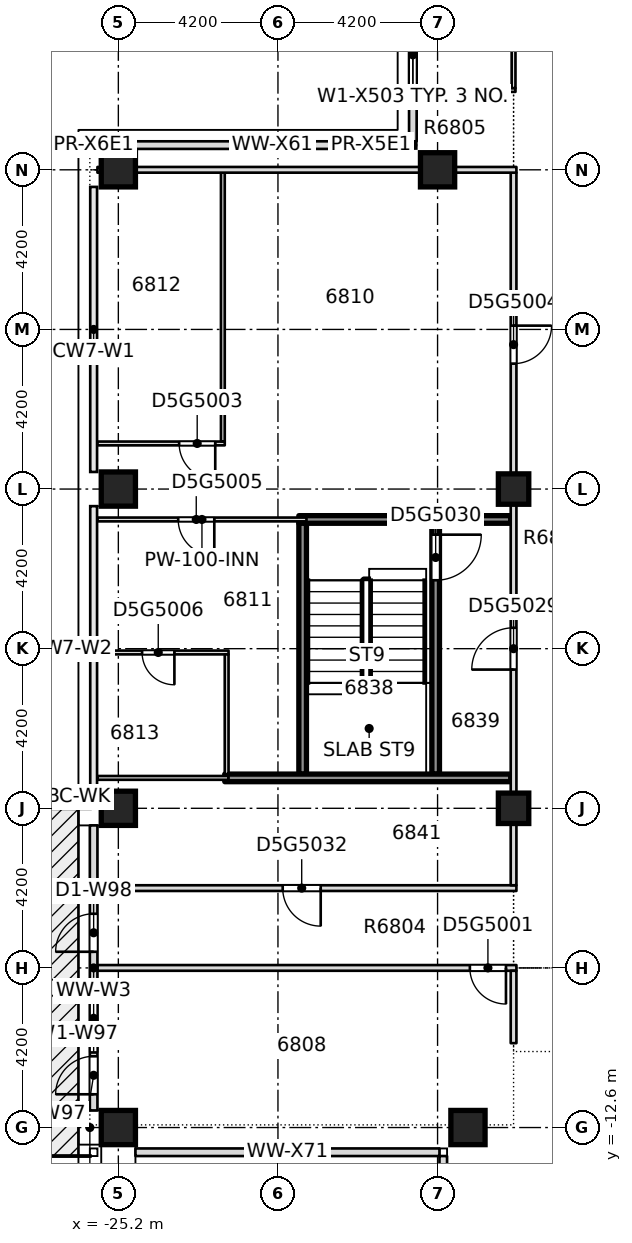
"""IFC4 building model, lengths in metres.
Left out: names, types, materials, properties, quantities, classifications, styles, units other than length and angle.
Written with IfcOpenShell. Run it as: python <this file> out.ifc"""

import sys

from ifc_helpers import new_model, si_unit, direction, frame, frame_2d, origin, origin_2d, place, context, subcontext, project, spatial, rectangle, extrude, element, fill, save


model = new_model("IFC4")
c1 = context("Model", 3, precision=1e-05, world=origin(), true_north=direction((0.0, 1.0)))
c2 = subcontext(c1, "Body", "Model", "MODEL_VIEW")
j1 = project(units=[si_unit("LENGTHUNIT", "METRE"), si_unit("PLANEANGLEUNIT", "RADIAN")], contexts=[c1])
p1 = place(None, origin())
s1 = spatial("IfcSite", under=j1, at=p1, CompositionType="ELEMENT")
p2 = place(p1, origin())
s2 = spatial("IfcBuilding", under=s1, at=p2, CompositionType="ELEMENT")
p3 = place(p2, frame((0.0, 0.0, 257.95)))
s3 = spatial("IfcBuildingStorey", under=s2, at=p3, CompositionType="ELEMENT", Elevation=257.95)
for number, where, z_axis, x_axis in (
    (1, (-25.2, -12.6, -0.4), (0.0, 0.0, 1.0), (1.0, 0.0, 0.0)),
    (2, (-16.0, -12.6, -0.4), (0.0, 0.0, 1.0), (1.0, 0.0, 0.0)),
    (3, (-25.2, -4.2, -0.4), (0.0, 0.0, 1.0), (1.0, 0.0, 0.0)),
    (4, (-25.2, 4.2, -0.4), (0.0, 0.0, 1.0), (1.0, 0.0, 0.0)),
    (5, (-25.2, 12.6, -0.4), (0.0, 0.0, 1.0), (1.0, 0.0, 0.0)),
    (6, (-16.8, 12.6, -0.4), (0.0, 0.0, 1.0), (1.0, 0.0, 0.0)),
):
    element("IfcColumn", number, at=place(p3, frame(where, z_axis=z_axis, x_axis=x_axis)), inside=s3, PredefinedType="COLUMN", context=c2, shape_type="SweptSolid", body=[
        extrude(rectangle(XDim=0.9, YDim=0.9, at=origin_2d()), origin(), (0.0, 0.0, 1.0), 3.45),
    ])
for number, where, z_axis, x_axis in (
    (7, (-14.8, -4.2, -0.4), (0.0, 0.0, 1.0), (1.0, 0.0, 0.0)),
    (8, (-14.8, 4.2, -0.4), (0.0, 0.0, 1.0), (1.0, 0.0, 0.0)),
):
    element("IfcColumn", number, at=place(p3, frame(where, z_axis=z_axis, x_axis=x_axis)), inside=s3, PredefinedType="COLUMN", context=c2, shape_type="SweptSolid", body=[
        extrude(rectangle(XDim=0.8, YDim=0.8, at=origin_2d()), origin(), (0.0, 0.0, 1.0), 3.45),
    ])
p4 = place(p3, frame((-25.75, -8.4, 0.0), z_axis=(0.0, 0.0, 1.0), x_axis=(1.0, 0.0, 0.0)))
e9 = element("IfcWall", 9, at=p4, inside=s3, PredefinedType="PARTITIONING", context=c2, shape_type="SweptSolid", body=[
    extrude(rectangle(XDim=11.025, YDim=0.15, at=frame_2d((5.512, 0.0))), origin(), (0.0, 0.0, 1.0), 3.05),
])
p5 = place(p4, frame((9.8, 0.0, 0.0)))
e10 = element("IfcOpeningElement", 10, at=p5, cuts=e9, PredefinedType="OPENING", context=c2, shape_type="SweptSolid", body=[
    extrude(rectangle(XDim=0.95, YDim=2.1, at=frame_2d((0.475, 1.05))), frame((0.0, 0.085, 0.0), z_axis=(0.0, -1.0, 0.0), x_axis=(1.0, 0.0, 0.0)), (0.0, 0.0, 1.0), 0.17),
])
p6 = place(p3, frame((-25.75, -6.3, 0.0), z_axis=(0.0, 0.0, 1.0), x_axis=(1.0, 0.0, 0.0)))
e11 = element("IfcWall", 11, at=p6, inside=s3, PredefinedType="PARTITIONING", context=c2, shape_type="SweptSolid", body=[
    extrude(rectangle(XDim=11.025, YDim=0.15, at=frame_2d((5.512, 0.0))), origin(), (0.0, 0.0, 1.0), 3.05),
])
p7 = place(p6, frame((4.875, 0.0, 0.0)))
e12 = element("IfcOpeningElement", 12, at=p7, cuts=e11, PredefinedType="OPENING", context=c2, shape_type="SweptSolid", body=[
    extrude(rectangle(XDim=1.0, YDim=2.1, at=frame_2d((0.5, 1.05))), frame((0.0, 0.085, 0.0), z_axis=(0.0, -1.0, 0.0), x_axis=(1.0, 0.0, 0.0)), (0.0, 0.0, 1.0), 0.17),
])
p8 = place(p3, frame((-25.75, -3.4, 0.0), z_axis=(0.0, 0.0, 1.0), x_axis=(1.0, 0.0, 0.0)))
e13 = element("IfcWall", 13, at=p8, inside=s3, PredefinedType="PARTITIONING", context=c2, shape_type="SweptSolid", body=[
    extrude(rectangle(XDim=3.45, YDim=0.1, at=frame_2d((1.725, 0.0))), origin(), (0.0, 0.0, 1.0), 3.05),
])
p9 = place(p3, frame((-25.75, -0.1, 0.0), z_axis=(0.0, 0.0, 1.0), x_axis=(1.0, 0.0, 0.0)))
e14 = element("IfcWall", 14, at=p9, inside=s3, PredefinedType="PARTITIONING", context=c2, shape_type="SweptSolid", body=[
    extrude(rectangle(XDim=3.45, YDim=0.1, at=frame_2d((1.725, 0.0))), origin(), (0.0, 0.0, 1.0), 3.05),
])
p10 = place(p9, frame((1.175, 0.0, 0.0)))
e15 = element("IfcOpeningElement", 15, at=p10, cuts=e14, PredefinedType="OPENING", context=c2, shape_type="SweptSolid", body=[
    extrude(rectangle(XDim=0.85, YDim=2.1, at=frame_2d((0.425, 1.05))), frame((0.0, 0.06, 0.0), z_axis=(0.0, -1.0, 0.0), x_axis=(1.0, 0.0, 0.0)), (0.0, 0.0, 1.0), 0.12),
])
p11 = place(p3, frame((-25.75, 3.4, 0.0), z_axis=(0.0, 0.0, 1.0), x_axis=(1.0, 0.0, 0.0)))
e16 = element("IfcWall", 16, at=p11, inside=s3, PredefinedType="PARTITIONING", context=c2, shape_type="SweptSolid", body=[
    extrude(rectangle(XDim=5.5, YDim=0.1, at=frame_2d((2.75, 0.0))), origin(), (0.0, 0.0, 1.0), 3.05),
])
p12 = place(p11, frame((2.125, 0.0, 0.0)))
e17 = element("IfcOpeningElement", 17, at=p12, cuts=e16, PredefinedType="OPENING", context=c2, shape_type="SweptSolid", body=[
    extrude(rectangle(XDim=0.95, YDim=2.1, at=frame_2d((0.475, 1.05))), frame((0.0, 0.06, 0.0), z_axis=(0.0, -1.0, 0.0), x_axis=(1.0, 0.0, 0.0)), (0.0, 0.0, 1.0), 0.12),
])
p13 = place(p3, frame((-20.45, 3.4, 0.0), z_axis=(0.0, 0.0, 1.0), x_axis=(1.0, 0.0, 0.0)))
e18 = element("IfcWall", 18, at=p13, inside=s3, PredefinedType="SOLIDWALL", context=c2, shape_type="SweptSolid", body=[
    extrude(rectangle(XDim=5.575, YDim=0.2, at=frame_2d((2.788, 0.0))), origin(), (0.0, 0.0, 1.0), 3.05),
])
p14 = place(p3, frame((-25.75, 5.4, 0.0), z_axis=(0.0, 0.0, 1.0), x_axis=(1.0, 0.0, 0.0)))
e19 = element("IfcWall", 19, at=p14, inside=s3, PredefinedType="PARTITIONING", context=c2, shape_type="SweptSolid", body=[
    extrude(rectangle(XDim=3.35, YDim=0.1, at=frame_2d((1.675, 0.0))), origin(), (0.0, 0.0, 1.0), 3.05),
])
p15 = place(p14, frame((2.15, 0.0, 0.0)))
e20 = element("IfcOpeningElement", 20, at=p15, cuts=e19, PredefinedType="OPENING", context=c2, shape_type="SweptSolid", body=[
    extrude(rectangle(XDim=0.95, YDim=2.1, at=frame_2d((0.475, 1.05))), frame((0.0, 0.06, 0.0), z_axis=(0.0, -1.0, 0.0), x_axis=(1.0, 0.0, 0.0)), (0.0, 0.0, 1.0), 0.12),
])
p16 = place(p3, frame((-25.75, 12.6, 0.0), z_axis=(0.0, 0.0, 1.0), x_axis=(1.0, 0.0, 0.0)))
e21 = element("IfcWall", 21, at=p16, inside=s3, PredefinedType="PARTITIONING", context=c2, shape_type="SweptSolid", body=[
    extrude(rectangle(XDim=1.0, YDim=0.15, at=frame_2d((0.5, 0.0))), origin(), (0.0, 0.0, 1.0), 3.05),
])
p17 = place(p3, frame((-17.35, 14.7, 0.0), z_axis=(0.0, 0.0, 1.0), x_axis=(1.0, 0.0, 0.0)))
e22 = element("IfcWall", 22, at=p17, inside=s3, PredefinedType="PARTITIONING", context=c2, shape_type="SweptSolid", body=[
    extrude(rectangle(XDim=0.2, YDim=0.15, at=frame_2d((0.1, 0.0))), origin(), (0.0, 0.0, 1.0), 3.05),
])
p18 = place(p3, frame((-17.25, 14.7, 0.0), z_axis=(0.0, 0.0, 1.0), x_axis=(1.0, 0.0, 0.0)))
e23 = element("IfcWall", 23, at=p18, inside=s3, PredefinedType="PARTITIONING", context=c2, shape_type="SweptSolid", body=[
    extrude(rectangle(XDim=2.5, YDim=0.1, at=frame_2d((1.25, 0.0))), origin(), (0.0, 0.0, 1.0), 3.05),
])
p19 = place(p3, frame((-22.45, 5.45, 0.0), z_axis=(0.0, 0.0, 1.0), x_axis=(0.0, 1.0, 0.0)))
e24 = element("IfcWall", 24, at=p19, inside=s3, PredefinedType="PARTITIONING", context=c2, shape_type="SweptSolid", body=[
    extrude(rectangle(XDim=7.075, YDim=0.1, at=frame_2d((3.538, 0.0))), origin(), (0.0, 0.0, 1.0), 3.05),
])
p20 = place(p3, frame((-22.35, -3.3, 0.0), z_axis=(0.0, 0.0, 1.0), x_axis=(0.0, 1.0, 0.0)))
e25 = element("IfcWall", 25, at=p20, inside=s3, PredefinedType="PARTITIONING", context=c2, shape_type="SweptSolid", body=[
    extrude(rectangle(XDim=3.15, YDim=0.1, at=frame_2d((1.575, 0.0))), origin(), (0.0, 0.0, 1.0), 3.05),
])
p21 = place(p3, frame((-16.85, -3.3, 0.0), z_axis=(0.0, 0.0, 1.0), x_axis=(0.0, 1.0, 0.0)))
e26 = element("IfcWall", 26, at=p21, inside=s3, PredefinedType="SOLIDWALL", context=c2, shape_type="SweptSolid", body=[
    extrude(rectangle(XDim=6.6, YDim=0.2, at=frame_2d((3.3, 0.0))), origin(), (0.0, 0.0, 1.0), 3.05),
])
p22 = place(p21, frame((5.1, 0.0, 0.0)))
e27 = element("IfcOpeningElement", 27, at=p22, cuts=e26, PredefinedType="OPENING", context=c2, shape_type="SweptSolid", body=[
    extrude(rectangle(XDim=1.2, YDim=2.1, at=frame_2d((0.6, 1.05))), frame((0.0, 0.11, 0.0), z_axis=(0.0, -1.0, 0.0), x_axis=(1.0, 0.0, 0.0)), (0.0, 0.0, 1.0), 0.22),
])
p23 = place(p3, frame((-14.8, -10.38, 0.0), z_axis=(0.0, 0.0, 1.0), x_axis=(0.0, 1.0, 0.0)))
e28 = element("IfcWall", 28, at=p23, inside=s3, PredefinedType="PARTITIONING", context=c2, shape_type="SweptSolid", body=[
    extrude(rectangle(XDim=1.905, YDim=0.15, at=frame_2d((0.952, 0.0))), origin(), (0.0, 0.0, 1.0), 3.05),
])
p24 = place(p3, frame((-14.8, -6.225, 0.0), z_axis=(0.0, 0.0, 1.0), x_axis=(0.0, 1.0, 0.0)))
e29 = element("IfcWall", 29, at=p24, inside=s3, PredefinedType="PARTITIONING", context=c2, shape_type="SweptSolid", body=[
    extrude(rectangle(XDim=18.75, YDim=0.15, at=frame_2d((9.375, 0.0))), origin(), (0.0, 0.0, 1.0), 3.05),
])
p25 = place(p24, frame((13.725, 0.0, 0.0)))
e30 = element("IfcOpeningElement", 30, at=p25, cuts=e29, PredefinedType="OPENING", context=c2, shape_type="SweptSolid", body=[
    extrude(rectangle(XDim=1.0, YDim=2.1, at=frame_2d((0.5, 1.05))), frame((0.0, 0.085, 0.0), z_axis=(0.0, -1.0, 0.0), x_axis=(1.0, 0.0, 0.0)), (0.0, 0.0, 1.0), 0.17),
])
p26 = place(p24, frame((5.675, 0.0, 0.0)))
e31 = element("IfcOpeningElement", 31, at=p26, cuts=e29, PredefinedType="OPENING", context=c2, shape_type="SweptSolid", body=[
    extrude(rectangle(XDim=1.1, YDim=2.1, at=frame_2d((0.55, 1.05))), frame((0.0, 0.085, 0.0), z_axis=(0.0, -1.0, 0.0), x_axis=(1.0, 0.0, 0.0)), (0.0, 0.0, 1.0), 0.17),
])
p27 = place(p3, frame((-14.8, 14.75, 0.0), z_axis=(0.0, 0.0, 1.0), x_axis=(0.0, 1.0, 0.0)))
e32 = element("IfcWall", 32, at=p27, inside=s3, PredefinedType="PARTITIONING", context=c2, shape_type="SweptSolid", body=[
    extrude(rectangle(XDim=1.7, YDim=0.1, at=frame_2d((0.85, 0.0))), origin(), (0.0, 0.0, 1.0), 3.05),
])
p28 = place(p3, frame((-17.45, 20.55, 0.0), z_axis=(0.0, 0.0, 1.0), x_axis=(0.0, -1.0, 0.0)))
e33 = element("IfcWall", 33, at=p28, inside=s3, PredefinedType="STANDARD", context=c2, shape_type="SweptSolid", body=[
    extrude(rectangle(XDim=7.2, YDim=0.2, at=frame_2d((3.6, 0.0))), origin(), (0.0, 0.0, 1.0), 3.05),
])
p29 = place(p28, frame((4.025, 0.0, 0.2)))
e34 = element("IfcOpeningElement", 34, at=p29, cuts=e33, PredefinedType="OPENING", context=c2, shape_type="SweptSolid", body=[
    extrude(rectangle(XDim=1.8, YDim=2.65, at=frame_2d((0.9, 1.325))), frame((0.0, 0.11, 0.0), z_axis=(0.0, -1.0, 0.0), x_axis=(1.0, 0.0, 0.0)), (0.0, 0.0, 1.0), 0.22),
])
p30 = place(p28, frame((0.425, 0.0, 0.2)))
e35 = element("IfcOpeningElement", 35, at=p30, cuts=e33, PredefinedType="OPENING", context=c2, shape_type="SweptSolid", body=[
    extrude(rectangle(XDim=1.8, YDim=2.65, at=frame_2d((0.9, 1.325))), frame((0.0, 0.11, 0.0), z_axis=(0.0, -1.0, 0.0), x_axis=(1.0, 0.0, 0.0)), (0.0, 0.0, 1.0), 0.22),
])
p31 = place(p3, frame((-17.55, 13.25, 0.0), z_axis=(0.0, 0.0, 1.0), x_axis=(-1.0, 0.0, 0.0)))
e36 = element("IfcWall", 36, at=p31, inside=s3, PredefinedType="STANDARD", context=c2, shape_type="SweptSolid", body=[
    extrude(rectangle(XDim=7.2, YDim=0.2, at=frame_2d((3.6, 0.0))), origin(), (0.0, 0.0, 1.0), 3.05),
])
p32 = place(p3, frame((-25.85, -4.65, 0.0), z_axis=(0.0, 0.0, 1.0), x_axis=(0.0, -1.0, 0.0)))
e37 = element("IfcWall", 37, at=p32, inside=s3, PredefinedType="STANDARD", context=c2, shape_type="SweptSolid", body=[
    extrude(rectangle(XDim=7.5, YDim=0.2, at=frame_2d((3.75, 0.0))), origin(), (0.0, 0.0, 1.0), 3.05),
])
p33 = place(p32, frame((4.175, 0.0, 0.2)))
e38 = element("IfcOpeningElement", 38, at=p33, cuts=e37, PredefinedType="OPENING", context=c2, shape_type="SweptSolid", body=[
    extrude(rectangle(XDim=1.8, YDim=2.65, at=frame_2d((0.9, 1.325))), frame((0.0, 0.11, 0.0), z_axis=(0.0, -1.0, 0.0), x_axis=(1.0, 0.0, 0.0)), (0.0, 0.0, 1.0), 0.22),
])
p34 = place(p32, frame((6.075, 0.0, 0.0)))
e39 = element("IfcOpeningElement", 39, at=p34, cuts=e37, PredefinedType="OPENING", context=c2, shape_type="SweptSolid", body=[
    extrude(rectangle(XDim=1.0, YDim=2.4, at=frame_2d((0.5, 1.2))), frame((0.0, 0.11, 0.0), z_axis=(0.0, -1.0, 0.0), x_axis=(1.0, 0.0, 0.0)), (0.0, 0.0, 1.0), 0.22),
])
p35 = place(p32, frame((2.325, 0.0, 0.0)))
e40 = element("IfcOpeningElement", 40, at=p35, cuts=e37, PredefinedType="OPENING", context=c2, shape_type="SweptSolid", body=[
    extrude(rectangle(XDim=1.0, YDim=2.4, at=frame_2d((0.5, 1.2))), frame((0.0, 0.11, 0.0), z_axis=(0.0, -1.0, 0.0), x_axis=(1.0, 0.0, 0.0)), (0.0, 0.0, 1.0), 0.22),
])
p36 = place(p3, frame((-24.75, -13.25, 0.0), z_axis=(0.0, 0.0, 1.0), x_axis=(1.0, 0.0, 0.0)))
e41 = element("IfcWall", 41, at=p36, inside=s3, PredefinedType="STANDARD", context=c2, shape_type="SweptSolid", body=[
    extrude(rectangle(XDim=8.0, YDim=0.2, at=frame_2d((4.0, 0.0))), origin(), (0.0, 0.0, 1.0), 3.05),
])
p37 = place(p3, frame((-16.65, -13.35, 0.0), z_axis=(0.0, 0.0, 1.0), x_axis=(0.0, -1.0, 0.0)))
e42 = element("IfcWall", 42, at=p37, inside=s3, PredefinedType="STANDARD", context=c2, shape_type="SweptSolid", body=[
    extrude(rectangle(XDim=7.2, YDim=0.2, at=frame_2d((3.6, 0.0))), origin(), (0.0, 0.0, 1.0), 3.05),
])
p38 = place(p37, frame((3.875, 0.0, 0.2)))
e43 = element("IfcOpeningElement", 43, at=p38, cuts=e42, PredefinedType="OPENING", context=c2, shape_type="SweptSolid", body=[
    extrude(rectangle(XDim=1.8, YDim=2.65, at=frame_2d((0.9, 1.325))), frame((0.0, 0.11, 0.0), z_axis=(0.0, -1.0, 0.0), x_axis=(1.0, 0.0, 0.0)), (0.0, 0.0, 1.0), 0.22),
])
p39 = place(p37, frame((0.275, 0.0, 0.2)))
e44 = element("IfcOpeningElement", 44, at=p39, cuts=e42, PredefinedType="OPENING", context=c2, shape_type="SweptSolid", body=[
    extrude(rectangle(XDim=1.8, YDim=2.65, at=frame_2d((0.9, 1.325))), frame((0.0, 0.11, 0.0), z_axis=(0.0, -1.0, 0.0), x_axis=(1.0, 0.0, 0.0)), (0.0, 0.0, 1.0), 0.22),
])
p40 = place(p3, frame((-20.35, -3.3, 0.0), z_axis=(0.0, 0.0, 1.0), x_axis=(0.0, 1.0, 0.0)))
e45 = element("IfcWall", 45, at=p40, inside=s3, PredefinedType="SOLIDWALL", context=c2, shape_type="SweptSolid", body=[
    extrude(rectangle(XDim=6.6, YDim=0.2, at=frame_2d((3.3, 0.0))), origin(), (0.0, 0.0, 1.0), 3.05),
])
p41 = place(p3, frame((-22.4, -3.4, 0.0), z_axis=(0.0, 0.0, 1.0), x_axis=(1.0, 0.0, 0.0)))
e46 = element("IfcWall", 46, at=p41, inside=s3, PredefinedType="SOLIDWALL", context=c2, shape_type="SweptSolid", body=[
    extrude(rectangle(XDim=7.525, YDim=0.2, at=frame_2d((3.762, 0.0))), origin(), (0.0, 0.0, 1.0), 3.05),
])
p42 = place(p3, frame((-24.75, 12.6, 0.0), z_axis=(0.0, 0.0, 1.0), x_axis=(1.0, 0.0, 0.0)))
e47 = element("IfcWall", 47, at=p42, inside=s3, PredefinedType="PARTITIONING", context=c2, shape_type="SweptSolid", body=[
    extrude(rectangle(XDim=7.5, YDim=0.15, at=frame_2d((3.75, 0.0))), origin(), (0.0, 0.0, 1.0), 2.5),
])
p43 = place(p3, frame((-17.25, 12.6, 0.0), z_axis=(0.0, 0.0, 1.0), x_axis=(1.0, 0.0, 0.0)))
e48 = element("IfcWall", 48, at=p43, inside=s3, PredefinedType="PARTITIONING", context=c2, shape_type="SweptSolid", body=[
    extrude(rectangle(XDim=2.525, YDim=0.15, at=frame_2d((1.262, 0.0))), origin(), (0.0, 0.0, 1.0), 3.05),
])
p44 = place(p5, origin())
e49 = element("IfcDoor", 49, at=p44, inside=s3, OperationType="SINGLE_SWING_RIGHT", PredefinedType="DOOR", context=c2, shape_type="SweptSolid", body=[
    extrude(rectangle(XDim=0.95, YDim=2.1, at=frame_2d((0.475, 1.05))), frame((0.0, 0.025, 0.0), z_axis=(0.0, -1.0, 0.0), x_axis=(1.0, 0.0, 0.0)), (0.0, 0.0, 1.0), 0.05),
])
fill(e10, e49)
p45 = place(p15, origin())
e50 = element("IfcDoor", 50, at=p45, inside=s3, OperationType="SINGLE_SWING_RIGHT", PredefinedType="DOOR", context=c2, shape_type="SweptSolid", body=[
    extrude(rectangle(XDim=0.95, YDim=2.1, at=frame_2d((0.475, 1.05))), frame((0.0, 0.025, 0.0), z_axis=(0.0, -1.0, 0.0), x_axis=(1.0, 0.0, 0.0)), (0.0, 0.0, 1.0), 0.05),
])
fill(e20, e50)
p46 = place(p25, origin())
e51 = element("IfcDoor", 51, at=p46, inside=s3, OperationType="SINGLE_SWING_LEFT", PredefinedType="DOOR", context=c2, shape_type="SweptSolid", body=[
    extrude(rectangle(XDim=1.0, YDim=2.1, at=frame_2d((0.5, 1.05))), frame((0.0, 0.025, 0.0), z_axis=(0.0, -1.0, 0.0), x_axis=(1.0, 0.0, 0.0)), (0.0, 0.0, 1.0), 0.05),
])
fill(e30, e51)
p47 = place(p12, origin())
e52 = element("IfcDoor", 52, at=p47, inside=s3, OperationType="SINGLE_SWING_LEFT", PredefinedType="DOOR", context=c2, shape_type="SweptSolid", body=[
    extrude(rectangle(XDim=0.95, YDim=2.1, at=frame_2d((0.475, 1.05))), frame((0.0, 0.025, 0.0), z_axis=(0.0, -1.0, 0.0), x_axis=(1.0, 0.0, 0.0)), (0.0, 0.0, 1.0), 0.05),
])
fill(e17, e52)
p48 = place(p10, origin())
e53 = element("IfcDoor", 53, at=p48, inside=s3, OperationType="SINGLE_SWING_RIGHT", PredefinedType="DOOR", context=c2, shape_type="SweptSolid", body=[
    extrude(rectangle(XDim=0.85, YDim=2.1, at=frame_2d((0.425, 1.05))), frame((0.0, 0.025, 0.0), z_axis=(0.0, -1.0, 0.0), x_axis=(1.0, 0.0, 0.0)), (0.0, 0.0, 1.0), 0.05),
])
fill(e15, e53)
p49 = place(p26, origin())
e54 = element("IfcDoor", 54, at=p49, inside=s3, OperationType="SINGLE_SWING_RIGHT", PredefinedType="DOOR", context=c2, shape_type="SweptSolid", body=[
    extrude(rectangle(XDim=1.1, YDim=2.1, at=frame_2d((0.55, 1.05))), frame((0.0, 0.025, 0.0), z_axis=(0.0, -1.0, 0.0), x_axis=(1.0, 0.0, 0.0)), (0.0, 0.0, 1.0), 0.05),
])
fill(e31, e54)
p50 = place(p22, origin())
e55 = element("IfcDoor", 55, at=p50, inside=s3, OperationType="SINGLE_SWING_RIGHT", PredefinedType="DOOR", context=c2, shape_type="SweptSolid", body=[
    extrude(rectangle(XDim=1.2, YDim=2.1, at=frame_2d((0.6, 1.05))), frame((0.0, 0.025, 0.0), z_axis=(0.0, -1.0, 0.0), x_axis=(1.0, 0.0, 0.0)), (0.0, 0.0, 1.0), 0.05),
])
fill(e27, e55)
p51 = place(p7, origin())
e56 = element("IfcDoor", 56, at=p51, inside=s3, OperationType="SINGLE_SWING_RIGHT", PredefinedType="DOOR", context=c2, shape_type="SweptSolid", body=[
    extrude(rectangle(XDim=1.0, YDim=2.1, at=frame_2d((0.5, 1.05))), frame((0.0, 0.025, 0.0), z_axis=(0.0, -1.0, 0.0), x_axis=(1.0, 0.0, 0.0)), (0.0, 0.0, 1.0), 0.05),
])
fill(e12, e56)
p52 = place(p29, origin())
e57 = element("IfcWindow", 57, at=p52, inside=s3, PartitioningType="SINGLE_PANEL", PredefinedType="WINDOW", context=c2, shape_type="SweptSolid", body=[
    extrude(rectangle(XDim=1.8, YDim=2.65, at=frame_2d((0.9, 1.325))), frame((0.0, 0.03, 0.0), z_axis=(0.0, -1.0, 0.0), x_axis=(1.0, 0.0, 0.0)), (0.0, 0.0, 1.0), 0.06),
])
fill(e34, e57)
p53 = place(p33, origin())
e58 = element("IfcWindow", 58, at=p53, inside=s3, PartitioningType="SINGLE_PANEL", PredefinedType="WINDOW", context=c2, shape_type="SweptSolid", body=[
    extrude(rectangle(XDim=1.8, YDim=2.65, at=frame_2d((0.9, 1.325))), frame((0.0, 0.03, 0.0), z_axis=(0.0, -1.0, 0.0), x_axis=(1.0, 0.0, 0.0)), (0.0, 0.0, 1.0), 0.06),
])
fill(e38, e58)
p54 = place(p34, origin())
e59 = element("IfcDoor", 59, at=p54, inside=s3, OperationType="SINGLE_SWING_LEFT", PredefinedType="DOOR", context=c2, shape_type="SweptSolid", body=[
    extrude(rectangle(XDim=1.0, YDim=2.4, at=frame_2d((0.5, 1.2))), frame((0.0, 0.025, 0.0), z_axis=(0.0, -1.0, 0.0), x_axis=(1.0, 0.0, 0.0)), (0.0, 0.0, 1.0), 0.05),
])
fill(e39, e59)
p55 = place(p35, origin())
e60 = element("IfcDoor", 60, at=p55, inside=s3, OperationType="SINGLE_SWING_LEFT", PredefinedType="DOOR", context=c2, shape_type="SweptSolid", body=[
    extrude(rectangle(XDim=1.0, YDim=2.4, at=frame_2d((0.5, 1.2))), frame((0.0, 0.025, 0.0), z_axis=(0.0, -1.0, 0.0), x_axis=(1.0, 0.0, 0.0)), (0.0, 0.0, 1.0), 0.05),
])
fill(e40, e60)
save(model, sys.argv[1])
